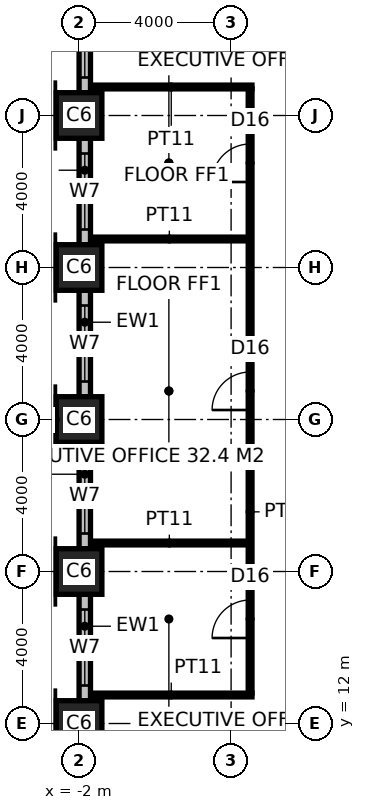
"""IFC4 building model, lengths in metres.
Left out: names, types, materials, properties, quantities, classifications, styles, units other than length and angle.
Written with IfcOpenShell. Run it as: python <this file> out.ifc"""

import sys

from ifc_helpers import new_model, si_unit, direction, frame, frame_2d, origin, origin_2d, place, context, subcontext, project, spatial, rectangle, hollow_rectangle, extrude, element, fill, save


model = new_model("IFC4")
c1 = context("Model", 3, precision=1e-05, world=origin(), true_north=direction((0.0, 1.0)))
c2 = subcontext(c1, "Body", "Model", "MODEL_VIEW")
j1 = project(units=[si_unit("LENGTHUNIT", "METRE"), si_unit("PLANEANGLEUNIT", "RADIAN")], contexts=[c1])
p1 = place(None, origin())
s1 = spatial("IfcSite", under=j1, at=p1, CompositionType="ELEMENT")
p2 = place(p1, origin())
s2 = spatial("IfcBuilding", under=s1, at=p2, CompositionType="ELEMENT")
p3 = place(p2, frame((0.0, 0.0, 39.0)))
s3 = spatial("IfcBuildingStorey", under=s2, at=p3, CompositionType="ELEMENT", Elevation=39.0)
for number, where, z_axis, x_axis in (
    (1, (-2.0, 12.0, 0.0), (0.0, 0.0, 1.0), (1.0, 0.0, 0.0)),
    (2, (-2.0, 16.0, 0.0), (0.0, 0.0, 1.0), (1.0, 0.0, 0.0)),
    (3, (-2.0, 20.0, 0.0), (0.0, 0.0, 1.0), (1.0, 0.0, 0.0)),
    (4, (-2.0, 24.0, 0.0), (0.0, 0.0, 1.0), (1.0, 0.0, 0.0)),
    (5, (-2.0, 28.0, 0.0), (0.0, 0.0, 1.0), (1.0, 0.0, 0.0)),
):
    element("IfcColumn", number, at=place(p3, frame(where, z_axis=z_axis, x_axis=x_axis)), inside=s3, PredefinedType="COLUMN", context=c2, shape_type="SweptSolid", body=[
        extrude(hollow_rectangle(XDim=1.2, YDim=1.2, WallThickness=0.125, at=origin_2d()), origin(), (0.0, 0.0, 1.0), 4.0),
    ])
p4 = place(p3, frame((-1.7, 12.75, 0.0), z_axis=(0.0, 0.0, 1.0), x_axis=(1.0, 0.0, 0.0)))
e6 = element("IfcWall", 6, at=p4, inside=s3, PredefinedType="PARTITIONING", context=c2, shape_type="SweptSolid", body=[
    extrude(rectangle(XDim=4.25, YDim=0.1, at=frame_2d((2.125, 0.0))), origin(), (0.0, 0.0, 1.0), 3.85),
])
for number, where, z_axis, x_axis in (
    (7, (-1.7, 16.75, 0.0), (0.0, 0.0, 1.0), (1.0, 0.0, 0.0)),
    (8, (-1.7, 24.75, 0.0), (0.0, 0.0, 1.0), (1.0, 0.0, 0.0)),
):
    element("IfcWall", number, at=place(p3, frame(where, z_axis=z_axis, x_axis=x_axis)), inside=s3, PredefinedType="PARTITIONING", context=c2, shape_type="SweptSolid", body=[
        extrude(rectangle(XDim=4.15, YDim=0.1, at=frame_2d((2.075, 0.0))), origin(), (0.0, 0.0, 1.0), 3.85),
    ])
p5 = place(p3, frame((-1.7, 28.75, 0.0), z_axis=(0.0, 0.0, 1.0), x_axis=(1.0, 0.0, 0.0)))
e9 = element("IfcWall", 9, at=p5, inside=s3, PredefinedType="PARTITIONING", context=c2, shape_type="SweptSolid", body=[
    extrude(rectangle(XDim=4.25, YDim=0.1, at=frame_2d((2.125, 0.0))), origin(), (0.0, 0.0, 1.0), 3.85),
])
p6 = place(p3, frame((2.5, 12.8, 0.0), z_axis=(0.0, 0.0, 1.0), x_axis=(0.0, 1.0, 0.0)))
e10 = element("IfcWall", 10, at=p6, inside=s3, PredefinedType="PARTITIONING", context=c2, shape_type="SweptSolid", body=[
    extrude(rectangle(XDim=15.9, YDim=0.1, at=frame_2d((7.95, 0.0))), origin(), (0.0, 0.0, 1.0), 2.65),
])
p7 = place(p6, frame((1.45, 0.0, 0.0)))
e11 = element("IfcOpeningElement", 11, at=p7, cuts=e10, PredefinedType="OPENING", context=c2, shape_type="SweptSolid", body=[
    extrude(rectangle(XDim=1.0, YDim=2.2, at=frame_2d((0.5, 1.1))), frame((0.0, 0.06, 0.0), z_axis=(0.0, -1.0, 0.0), x_axis=(1.0, 0.0, 0.0)), (0.0, 0.0, 1.0), 0.12),
])
p8 = place(p6, frame((7.45, 0.0, 0.0)))
e12 = element("IfcOpeningElement", 12, at=p8, cuts=e10, PredefinedType="OPENING", context=c2, shape_type="SweptSolid", body=[
    extrude(rectangle(XDim=1.0, YDim=2.2, at=frame_2d((0.5, 1.1))), frame((0.0, 0.06, 0.0), z_axis=(0.0, -1.0, 0.0), x_axis=(1.0, 0.0, 0.0)), (0.0, 0.0, 1.0), 0.12),
])
p9 = place(p6, frame((13.45, 0.0, 0.0)))
e13 = element("IfcOpeningElement", 13, at=p9, cuts=e10, PredefinedType="OPENING", context=c2, shape_type="SweptSolid", body=[
    extrude(rectangle(XDim=1.0, YDim=2.2, at=frame_2d((0.5, 1.1))), frame((0.0, 0.06, 0.0), z_axis=(0.0, -1.0, 0.0), x_axis=(1.0, 0.0, 0.0)), (0.0, 0.0, 1.0), 0.12),
])
p10 = place(p3, frame((-1.85, 15.4, 0.0), z_axis=(0.0, 0.0, 1.0), x_axis=(0.0, -1.0, 0.0)))
e14 = element("IfcWall", 14, at=p10, inside=s3, PredefinedType="ELEMENTEDWALL", context=c2, shape_type="SweptSolid", body=[
    extrude(rectangle(XDim=2.8, YDim=0.3, at=frame_2d((1.4, 0.0))), origin(), (0.0, 0.0, 1.0), 2.85),
])
p11 = place(p10, frame((0.4, 0.0, 0.8)))
e15 = element("IfcOpeningElement", 15, at=p11, cuts=e14, PredefinedType="OPENING", context=c2, shape_type="SweptSolid", body=[
    extrude(rectangle(XDim=2.0, YDim=1.8, at=frame_2d((1.0, 0.9))), frame((0.0, 0.16, 0.0), z_axis=(0.0, -1.0, 0.0), x_axis=(1.0, 0.0, 0.0)), (0.0, 0.0, 1.0), 0.32),
])
p12 = place(p3, frame((-1.85, 19.4, 0.0), z_axis=(0.0, 0.0, 1.0), x_axis=(0.0, -1.0, 0.0)))
e16 = element("IfcWall", 16, at=p12, inside=s3, PredefinedType="ELEMENTEDWALL", context=c2, shape_type="SweptSolid", body=[
    extrude(rectangle(XDim=2.8, YDim=0.3, at=frame_2d((1.4, 0.0))), origin(), (0.0, 0.0, 1.0), 2.85),
])
p13 = place(p12, frame((0.4, 0.0, 0.8)))
e17 = element("IfcOpeningElement", 17, at=p13, cuts=e16, PredefinedType="OPENING", context=c2, shape_type="SweptSolid", body=[
    extrude(rectangle(XDim=2.0, YDim=1.8, at=frame_2d((1.0, 0.9))), frame((0.0, 0.16, 0.0), z_axis=(0.0, -1.0, 0.0), x_axis=(1.0, 0.0, 0.0)), (0.0, 0.0, 1.0), 0.32),
])
p14 = place(p3, frame((-1.85, 23.4, 0.0), z_axis=(0.0, 0.0, 1.0), x_axis=(0.0, -1.0, 0.0)))
e18 = element("IfcWall", 18, at=p14, inside=s3, PredefinedType="ELEMENTEDWALL", context=c2, shape_type="SweptSolid", body=[
    extrude(rectangle(XDim=2.8, YDim=0.3, at=frame_2d((1.4, 0.0))), origin(), (0.0, 0.0, 1.0), 2.85),
])
p15 = place(p14, frame((0.4, 0.0, 0.8)))
e19 = element("IfcOpeningElement", 19, at=p15, cuts=e18, PredefinedType="OPENING", context=c2, shape_type="SweptSolid", body=[
    extrude(rectangle(XDim=2.0, YDim=1.8, at=frame_2d((1.0, 0.9))), frame((0.0, 0.16, 0.0), z_axis=(0.0, -1.0, 0.0), x_axis=(1.0, 0.0, 0.0)), (0.0, 0.0, 1.0), 0.32),
])
p16 = place(p3, frame((-1.85, 27.4, 0.0), z_axis=(0.0, 0.0, 1.0), x_axis=(0.0, -1.0, 0.0)))
e20 = element("IfcWall", 20, at=p16, inside=s3, PredefinedType="ELEMENTEDWALL", context=c2, shape_type="SweptSolid", body=[
    extrude(rectangle(XDim=2.8, YDim=0.3, at=frame_2d((1.4, 0.0))), origin(), (0.0, 0.0, 1.0), 2.85),
])
p17 = place(p16, frame((0.4, 0.0, 0.8)))
e21 = element("IfcOpeningElement", 21, at=p17, cuts=e20, PredefinedType="OPENING", context=c2, shape_type="SweptSolid", body=[
    extrude(rectangle(XDim=2.0, YDim=1.8, at=frame_2d((1.0, 0.9))), frame((0.0, 0.16, 0.0), z_axis=(0.0, -1.0, 0.0), x_axis=(1.0, 0.0, 0.0)), (0.0, 0.0, 1.0), 0.32),
])
p18 = place(p3, frame((-1.85, 31.4, 0.0), z_axis=(0.0, 0.0, 1.0), x_axis=(0.0, -1.0, 0.0)))
e22 = element("IfcWall", 22, at=p18, inside=s3, PredefinedType="ELEMENTEDWALL", context=c2, shape_type="SweptSolid", body=[
    extrude(rectangle(XDim=2.8, YDim=0.3, at=frame_2d((1.4, 0.0))), origin(), (0.0, 0.0, 1.0), 2.85),
])
p19 = place(p18, frame((0.4, 0.0, 0.8)))
e23 = element("IfcOpeningElement", 23, at=p19, cuts=e22, PredefinedType="OPENING", context=c2, shape_type="SweptSolid", body=[
    extrude(rectangle(XDim=2.0, YDim=1.8, at=frame_2d((1.0, 0.9))), frame((0.0, 0.16, 0.0), z_axis=(0.0, -1.0, 0.0), x_axis=(1.0, 0.0, 0.0)), (0.0, 0.0, 1.0), 0.32),
])
p20 = place(p7, origin())
e24 = element("IfcDoor", 24, at=p20, inside=s3, OperationType="SINGLE_SWING_LEFT", PredefinedType="DOOR", context=c2, shape_type="SweptSolid", body=[
    extrude(rectangle(XDim=1.0, YDim=2.2, at=frame_2d((0.5, 1.1))), frame((0.0, 0.025, 0.0), z_axis=(0.0, -1.0, 0.0), x_axis=(1.0, 0.0, 0.0)), (0.0, 0.0, 1.0), 0.05),
])
fill(e11, e24)
p21 = place(p8, origin())
e25 = element("IfcDoor", 25, at=p21, inside=s3, OperationType="SINGLE_SWING_LEFT", PredefinedType="DOOR", context=c2, shape_type="SweptSolid", body=[
    extrude(rectangle(XDim=1.0, YDim=2.2, at=frame_2d((0.5, 1.1))), frame((0.0, 0.025, 0.0), z_axis=(0.0, -1.0, 0.0), x_axis=(1.0, 0.0, 0.0)), (0.0, 0.0, 1.0), 0.05),
])
fill(e12, e25)
p22 = place(p9, origin())
e26 = element("IfcDoor", 26, at=p22, inside=s3, OperationType="SINGLE_SWING_LEFT", PredefinedType="DOOR", context=c2, shape_type="SweptSolid", body=[
    extrude(rectangle(XDim=1.0, YDim=2.2, at=frame_2d((0.5, 1.1))), frame((0.0, 0.025, 0.0), z_axis=(0.0, -1.0, 0.0), x_axis=(1.0, 0.0, 0.0)), (0.0, 0.0, 1.0), 0.05),
])
fill(e13, e26)
p23 = place(p11, origin())
e27 = element("IfcWindow", 27, at=p23, inside=s3, PartitioningType="SINGLE_PANEL", PredefinedType="WINDOW", context=c2, shape_type="SweptSolid", body=[
    extrude(rectangle(XDim=2.0, YDim=1.8, at=frame_2d((1.0, 0.9))), frame((0.0, 0.03, 0.0), z_axis=(0.0, -1.0, 0.0), x_axis=(1.0, 0.0, 0.0)), (0.0, 0.0, 1.0), 0.06),
])
fill(e15, e27)
p24 = place(p13, origin())
e28 = element("IfcWindow", 28, at=p24, inside=s3, PartitioningType="SINGLE_PANEL", PredefinedType="WINDOW", context=c2, shape_type="SweptSolid", body=[
    extrude(rectangle(XDim=2.0, YDim=1.8, at=frame_2d((1.0, 0.9))), frame((0.0, 0.03, 0.0), z_axis=(0.0, -1.0, 0.0), x_axis=(1.0, 0.0, 0.0)), (0.0, 0.0, 1.0), 0.06),
])
fill(e17, e28)
p25 = place(p15, origin())
e29 = element("IfcWindow", 29, at=p25, inside=s3, PartitioningType="SINGLE_PANEL", PredefinedType="WINDOW", context=c2, shape_type="SweptSolid", body=[
    extrude(rectangle(XDim=2.0, YDim=1.8, at=frame_2d((1.0, 0.9))), frame((0.0, 0.03, 0.0), z_axis=(0.0, -1.0, 0.0), x_axis=(1.0, 0.0, 0.0)), (0.0, 0.0, 1.0), 0.06),
])
fill(e19, e29)
p26 = place(p17, origin())
e30 = element("IfcWindow", 30, at=p26, inside=s3, PartitioningType="SINGLE_PANEL", PredefinedType="WINDOW", context=c2, shape_type="SweptSolid", body=[
    extrude(rectangle(XDim=2.0, YDim=1.8, at=frame_2d((1.0, 0.9))), frame((0.0, 0.03, 0.0), z_axis=(0.0, -1.0, 0.0), x_axis=(1.0, 0.0, 0.0)), (0.0, 0.0, 1.0), 0.06),
])
fill(e21, e30)
p27 = place(p19, origin())
e31 = element("IfcWindow", 31, at=p27, inside=s3, PartitioningType="SINGLE_PANEL", PredefinedType="WINDOW", context=c2, shape_type="SweptSolid", body=[
    extrude(rectangle(XDim=2.0, YDim=1.8, at=frame_2d((1.0, 0.9))), frame((0.0, 0.03, 0.0), z_axis=(0.0, -1.0, 0.0), x_axis=(1.0, 0.0, 0.0)), (0.0, 0.0, 1.0), 0.06),
])
fill(e23, e31)
save(model, sys.argv[1])
